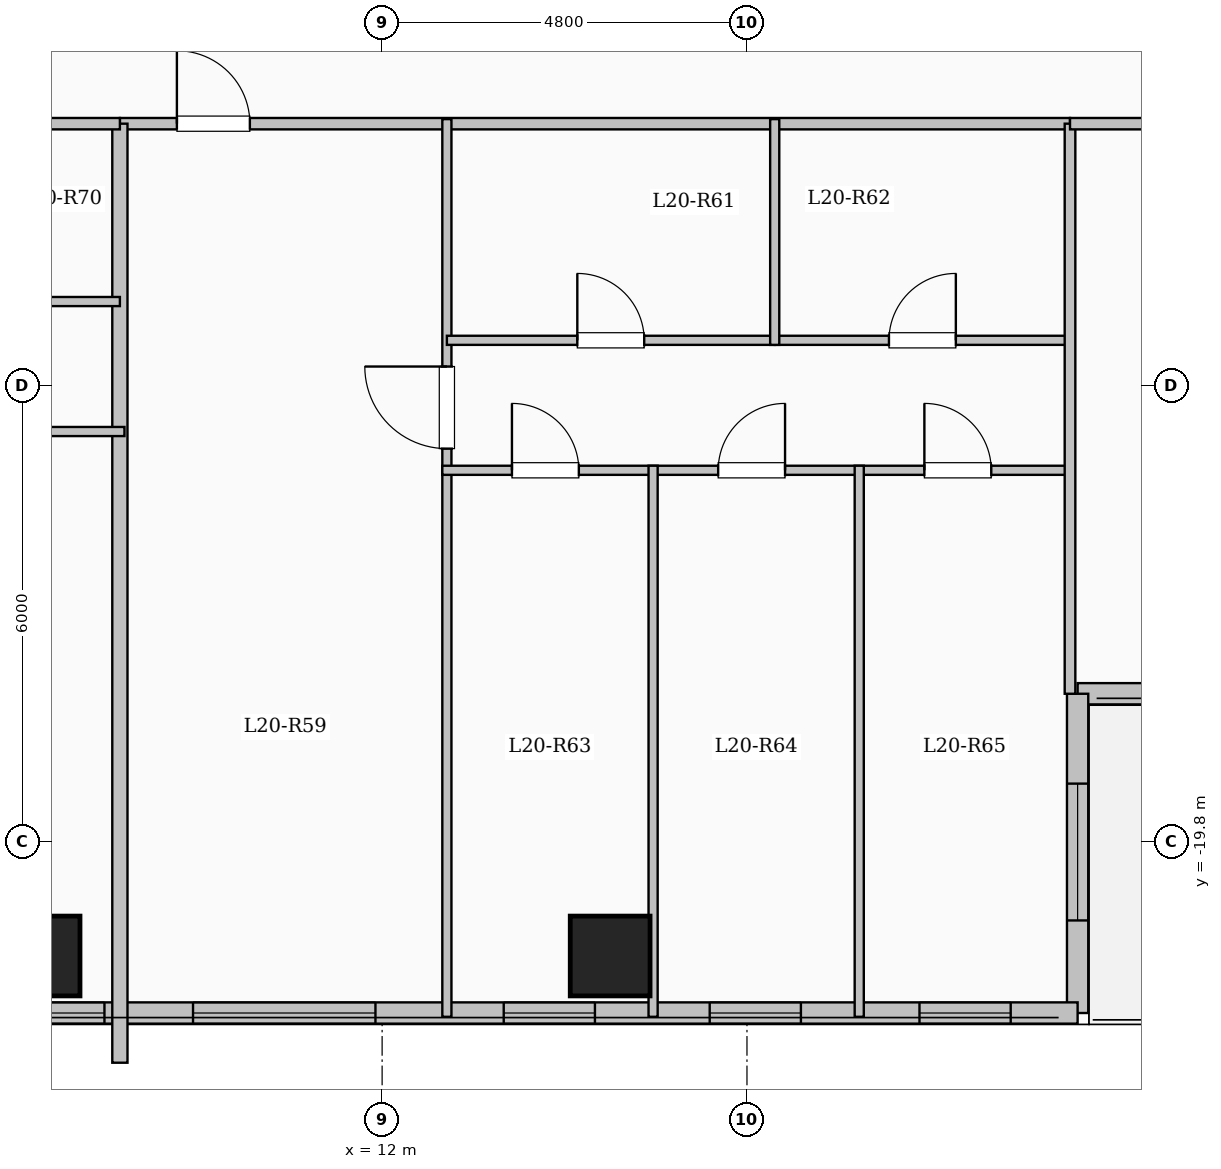
"""IFC4 building model, lengths in metres.
Left out: names, types, materials, properties, quantities, classifications, styles, units other than length and angle.
Written with IfcOpenShell. Run it as: python <this file> out.ifc"""

import sys

from ifc_helpers import new_model, si_unit, direction, frame, frame_2d, origin, origin_2d, place, context, subcontext, project, spatial, rectangle, extrude, element, fill, save


model = new_model("IFC4")
c1 = context("Model", 3, precision=1e-05, world=origin(), true_north=direction((0.0, 1.0)))
c2 = subcontext(c1, "Body", "Model", "MODEL_VIEW")
j1 = project(units=[si_unit("LENGTHUNIT", "METRE"), si_unit("PLANEANGLEUNIT", "RADIAN")], contexts=[c1])
p1 = place(None, origin())
s1 = spatial("IfcSite", under=j1, at=p1, CompositionType="ELEMENT")
p2 = place(p1, origin())
s2 = spatial("IfcBuilding", under=s1, at=p2, CompositionType="ELEMENT")
p3 = place(p2, frame((0.0, 0.0, 78.3)))
s3 = spatial("IfcBuildingStorey", under=s2, at=p3, CompositionType="ELEMENT", Elevation=78.3)
for number, where, z_axis, x_axis in (
    (1, (7.5, -21.3, 0.0), (0.0, 0.0, 1.0), (1.0, 0.0, 0.0)),
    (2, (15.0, -21.3, 0.0), (0.0, 0.0, 1.0), (1.0, 0.0, 0.0)),
):
    element("IfcColumn", number, at=place(p3, frame(where, z_axis=z_axis, x_axis=x_axis)), inside=s3, PredefinedType="COLUMN", context=c2, shape_type="SweptSolid", body=[
        extrude(rectangle(XDim=1.05, YDim=1.05, at=origin_2d()), origin(), (0.0, 0.0, 1.0), 3.35),
    ])
p4 = place(p3, frame((26.85, -17.85, 0.0), z_axis=(0.0, 0.0, 1.0), x_axis=(-1.0, 0.0, 0.0)))
e3 = element("IfcWall", 3, at=p4, inside=s3, PredefinedType="SOLIDWALL", context=c2, shape_type="SweptSolid", body=[
    extrude(rectangle(XDim=5.7, YDim=0.28, at=frame_2d((2.85, 0.0))), origin(), (0.0, 0.0, 1.0), 3.1),
])
p5 = place(p4, frame((2.5, 0.0, 0.0)))
e4 = element("IfcOpeningElement", 4, at=p5, cuts=e3, PredefinedType="OPENING", context=c2, shape_type="SweptSolid", body=[
    extrude(rectangle(XDim=1.1, YDim=2.2, at=frame_2d((0.55, 1.1))), frame((0.0, 0.15, 0.0), z_axis=(0.0, -1.0, 0.0), x_axis=(1.0, 0.0, 0.0)), (0.0, 0.0, 1.0), 0.3),
])
p6 = place(p4, frame((0.755, 0.0, 0.95)))
e5 = element("IfcOpeningElement", 5, at=p6, cuts=e3, PredefinedType="OPENING", context=c2, shape_type="SweptSolid", body=[
    extrude(rectangle(XDim=1.2, YDim=1.5, at=frame_2d((0.6, 0.75))), frame((0.0, 0.15, 0.0), z_axis=(0.0, -1.0, 0.0), x_axis=(1.0, 0.0, 0.0)), (0.0, 0.0, 1.0), 0.3),
])
p7 = place(p3, frame((21.15, -17.85, 0.0), z_axis=(0.0, 0.0, 1.0), x_axis=(0.0, -1.0, 0.0)))
e6 = element("IfcWall", 6, at=p7, inside=s3, PredefinedType="SOLIDWALL", context=c2, shape_type="SweptSolid", body=[
    extrude(rectangle(XDim=4.2, YDim=0.28, at=frame_2d((2.1, 0.0))), origin(), (0.0, 0.0, 1.0), 3.1),
])
p8 = place(p7, frame((1.182, 0.0, 0.9)))
e7 = element("IfcOpeningElement", 7, at=p8, cuts=e6, PredefinedType="OPENING", context=c2, shape_type="SweptSolid", body=[
    extrude(rectangle(XDim=1.8, YDim=1.65, at=frame_2d((0.9, 0.825))), frame((0.0, 0.15, 0.0), z_axis=(0.0, -1.0, 0.0), x_axis=(1.0, 0.0, 0.0)), (0.0, 0.0, 1.0), 0.3),
])
p9 = place(p3, frame((21.15, -22.05, 0.0), z_axis=(0.0, 0.0, 1.0), x_axis=(-1.0, 0.0, 0.0)))
e8 = element("IfcWall", 8, at=p9, inside=s3, PredefinedType="SOLIDWALL", context=c2, shape_type="SweptSolid", body=[
    extrude(rectangle(XDim=13.8, YDim=0.28, at=frame_2d((6.9, 0.0))), origin(), (0.0, 0.0, 1.0), 3.1),
])
p10 = place(p9, frame((0.88, 0.0, 0.95)))
e9 = element("IfcOpeningElement", 9, at=p10, cuts=e8, PredefinedType="OPENING", context=c2, shape_type="SweptSolid", body=[
    extrude(rectangle(XDim=1.2, YDim=1.5, at=frame_2d((0.6, 0.75))), frame((0.0, 0.15, 0.0), z_axis=(0.0, -1.0, 0.0), x_axis=(1.0, 0.0, 0.0)), (0.0, 0.0, 1.0), 0.3),
])
p11 = place(p9, frame((3.64, 0.0, 0.95)))
e10 = element("IfcOpeningElement", 10, at=p11, cuts=e8, PredefinedType="OPENING", context=c2, shape_type="SweptSolid", body=[
    extrude(rectangle(XDim=1.2, YDim=1.5, at=frame_2d((0.6, 0.75))), frame((0.0, 0.15, 0.0), z_axis=(0.0, -1.0, 0.0), x_axis=(1.0, 0.0, 0.0)), (0.0, 0.0, 1.0), 0.3),
])
p12 = place(p9, frame((6.35, 0.0, 0.95)))
e11 = element("IfcOpeningElement", 11, at=p12, cuts=e8, PredefinedType="OPENING", context=c2, shape_type="SweptSolid", body=[
    extrude(rectangle(XDim=1.2, YDim=1.5, at=frame_2d((0.6, 0.75))), frame((0.0, 0.15, 0.0), z_axis=(0.0, -1.0, 0.0), x_axis=(1.0, 0.0, 0.0)), (0.0, 0.0, 1.0), 0.3),
])
p13 = place(p9, frame((9.238, 0.0, 0.9)))
e12 = element("IfcOpeningElement", 12, at=p13, cuts=e8, PredefinedType="OPENING", context=c2, shape_type="SweptSolid", body=[
    extrude(rectangle(XDim=2.4, YDim=1.8, at=frame_2d((1.2, 0.9))), frame((0.0, 0.15, 0.0), z_axis=(0.0, -1.0, 0.0), x_axis=(1.0, 0.0, 0.0)), (0.0, 0.0, 1.0), 0.3),
])
p14 = place(p9, frame((12.803, 0.0, 0.95)))
e13 = element("IfcOpeningElement", 13, at=p14, cuts=e8, PredefinedType="OPENING", context=c2, shape_type="SweptSolid", body=[
    extrude(rectangle(XDim=0.85, YDim=1.5, at=frame_2d((0.425, 0.75))), frame((0.0, 0.15, 0.0), z_axis=(0.0, -1.0, 0.0), x_axis=(1.0, 0.0, 0.0)), (0.0, 0.0, 1.0), 0.3),
])
p15 = place(p3, frame((8.55, -10.35, 0.0), z_axis=(0.0, 0.0, 1.0), x_axis=(1.0, 0.0, 0.0)))
e14 = element("IfcWall", 14, at=p15, inside=s3, PredefinedType="PARTITIONING", context=c2, shape_type="SweptSolid", body=[
    extrude(rectangle(XDim=12.5, YDim=0.15, at=frame_2d((6.25, 0.0))), origin(), (0.0, 0.0, 1.0), 3.1),
])
p16 = place(p15, frame((0.75, 0.0, 0.0)))
e15 = element("IfcOpeningElement", 15, at=p16, cuts=e14, PredefinedType="OPENING", context=c2, shape_type="SweptSolid", body=[
    extrude(rectangle(XDim=0.96, YDim=2.15, at=frame_2d((0.48, 1.075))), frame((0.0, 0.085, 0.0), z_axis=(0.0, -1.0, 0.0), x_axis=(1.0, 0.0, 0.0)), (0.0, 0.0, 1.0), 0.17),
])
p17 = place(p3, frame((12.852, -22.1, 0.0), z_axis=(0.0, 0.0, 1.0), x_axis=(0.0, 1.0, 0.0)))
e16 = element("IfcWall", 16, at=p17, inside=s3, PredefinedType="PARTITIONING", context=c2, shape_type="SweptSolid", body=[
    extrude(rectangle(XDim=11.81, YDim=0.12, at=frame_2d((5.905, 0.0))), origin(), (0.0, 0.0, 1.0), 3.1),
])
p18 = place(p17, frame((7.475, 0.0, 0.0)))
e17 = element("IfcOpeningElement", 17, at=p18, cuts=e16, PredefinedType="OPENING", context=c2, shape_type="SweptSolid", body=[
    extrude(rectangle(XDim=1.08, YDim=2.15, at=frame_2d((0.54, 1.075))), frame((0.0, 0.07, 0.0), z_axis=(0.0, -1.0, 0.0), x_axis=(1.0, 0.0, 0.0)), (0.0, 0.0, 1.0), 0.14),
])
p19 = place(p3, frame((12.852, -13.2, 0.0), z_axis=(0.0, 0.0, 1.0), x_axis=(1.0, 0.0, 0.0)))
e18 = element("IfcWall", 18, at=p19, inside=s3, PredefinedType="PARTITIONING", context=c2, shape_type="SweptSolid", body=[
    extrude(rectangle(XDim=4.313, YDim=0.12, at=frame_2d((2.156, 0.0))), origin(), (0.0, 0.0, 1.0), 3.1),
])
p20 = place(p19, frame((1.716, 0.0, 0.0)))
e19 = element("IfcOpeningElement", 19, at=p20, cuts=e18, PredefinedType="OPENING", context=c2, shape_type="SweptSolid", body=[
    extrude(rectangle(XDim=0.88, YDim=2.1, at=frame_2d((0.44, 1.05))), frame((0.0, 0.07, 0.0), z_axis=(0.0, -1.0, 0.0), x_axis=(1.0, 0.0, 0.0)), (0.0, 0.0, 1.0), 0.14),
])
p21 = place(p3, frame((17.165, -13.2, 0.0), z_axis=(0.0, 0.0, 1.0), x_axis=(1.0, 0.0, 0.0)))
e20 = element("IfcWall", 20, at=p21, inside=s3, PredefinedType="PARTITIONING", context=c2, shape_type="SweptSolid", body=[
    extrude(rectangle(XDim=3.885, YDim=0.12, at=frame_2d((1.942, 0.0))), origin(), (0.0, 0.0, 1.0), 3.1),
])
p22 = place(p21, frame((1.503, 0.0, 0.0)))
e21 = element("IfcOpeningElement", 21, at=p22, cuts=e20, PredefinedType="OPENING", context=c2, shape_type="SweptSolid", body=[
    extrude(rectangle(XDim=0.88, YDim=2.1, at=frame_2d((0.44, 1.05))), frame((0.0, 0.07, 0.0), z_axis=(0.0, -1.0, 0.0), x_axis=(1.0, 0.0, 0.0)), (0.0, 0.0, 1.0), 0.14),
])
p23 = place(p3, frame((12.792, -14.91, 0.0), z_axis=(0.0, 0.0, 1.0), x_axis=(1.0, 0.0, 0.0)))
e22 = element("IfcWall", 22, at=p23, inside=s3, PredefinedType="PARTITIONING", context=c2, shape_type="SweptSolid", body=[
    extrude(rectangle(XDim=8.318, YDim=0.12, at=frame_2d((4.159, 0.0))), origin(), (0.0, 0.0, 1.0), 3.1),
])
p24 = place(p23, frame((0.916, 0.0, 0.0)))
e23 = element("IfcOpeningElement", 23, at=p24, cuts=e22, PredefinedType="OPENING", context=c2, shape_type="SweptSolid", body=[
    extrude(rectangle(XDim=0.88, YDim=2.1, at=frame_2d((0.44, 1.05))), frame((0.0, 0.07, 0.0), z_axis=(0.0, -1.0, 0.0), x_axis=(1.0, 0.0, 0.0)), (0.0, 0.0, 1.0), 0.14),
])
p25 = place(p23, frame((3.629, 0.0, 0.0)))
e24 = element("IfcOpeningElement", 24, at=p25, cuts=e22, PredefinedType="OPENING", context=c2, shape_type="SweptSolid", body=[
    extrude(rectangle(XDim=0.88, YDim=2.1, at=frame_2d((0.44, 1.05))), frame((0.0, 0.07, 0.0), z_axis=(0.0, -1.0, 0.0), x_axis=(1.0, 0.0, 0.0)), (0.0, 0.0, 1.0), 0.14),
])
p26 = place(p23, frame((6.342, 0.0, 0.0)))
e25 = element("IfcOpeningElement", 25, at=p26, cuts=e22, PredefinedType="OPENING", context=c2, shape_type="SweptSolid", body=[
    extrude(rectangle(XDim=0.88, YDim=2.1, at=frame_2d((0.44, 1.05))), frame((0.0, 0.07, 0.0), z_axis=(0.0, -1.0, 0.0), x_axis=(1.0, 0.0, 0.0)), (0.0, 0.0, 1.0), 0.14),
])
p27 = place(p3, frame((17.165, -13.26, 0.0), z_axis=(0.0, 0.0, 1.0), x_axis=(0.0, 1.0, 0.0)))
e26 = element("IfcWall", 26, at=p27, inside=s3, PredefinedType="PARTITIONING", context=c2, shape_type="SweptSolid", body=[
    extrude(rectangle(XDim=2.97, YDim=0.12, at=frame_2d((1.485, 0.0))), origin(), (0.0, 0.0, 1.0), 3.1),
])
for number, where, z_axis, x_axis in (
    (27, (15.565, -22.1, 0.0), (0.0, 0.0, 1.0), (0.0, 1.0, 0.0)),
    (28, (18.277, -22.1, 0.0), (0.0, 0.0, 1.0), (0.0, 1.0, 0.0)),
):
    element("IfcWall", number, at=place(p3, frame(where, z_axis=z_axis, x_axis=x_axis)), inside=s3, PredefinedType="PARTITIONING", context=c2, shape_type="SweptSolid", body=[
        extrude(rectangle(XDim=7.25, YDim=0.12, at=frame_2d((3.625, 0.0))), origin(), (0.0, 0.0, 1.0), 3.1),
    ])
p28 = place(p3, frame((8.55, -22.704, 0.0), z_axis=(0.0, 0.0, 1.0), x_axis=(0.0, 1.0, 0.0)))
e29 = element("IfcWall", 29, at=p28, inside=s3, PredefinedType="SOLIDWALL", context=c2, shape_type="SweptSolid", body=[
    extrude(rectangle(XDim=12.354, YDim=0.2, at=frame_2d((6.177, 0.0))), origin(), (0.0, 0.0, 1.0), 3.1),
])
p29 = place(p3, frame((-8.55, -10.35, 0.0), z_axis=(0.0, 0.0, 1.0), x_axis=(1.0, 0.0, 0.0)))
e30 = element("IfcWall", 30, at=p29, inside=s3, PredefinedType="PARTITIONING", context=c2, shape_type="SweptSolid", body=[
    extrude(rectangle(XDim=17.1, YDim=0.15, at=frame_2d((8.55, 0.0))), origin(), (0.0, 0.0, 1.0), 3.1),
])
p30 = place(p29, frame((1.6, 0.0, 0.0)))
e31 = element("IfcOpeningElement", 31, at=p30, cuts=e30, PredefinedType="OPENING", context=c2, shape_type="SweptSolid", body=[
    extrude(rectangle(XDim=0.96, YDim=2.15, at=frame_2d((0.48, 1.075))), frame((0.0, 0.085, 0.0), z_axis=(0.0, -1.0, 0.0), x_axis=(1.0, 0.0, 0.0)), (0.0, 0.0, 1.0), 0.17),
])
p31 = place(p3, frame((4.104, -12.69, 0.0), z_axis=(0.0, 0.0, 1.0), x_axis=(1.0, 0.0, 0.0)))
e32 = element("IfcWall", 32, at=p31, inside=s3, PredefinedType="PARTITIONING", context=c2, shape_type="SweptSolid", body=[
    extrude(rectangle(XDim=4.446, YDim=0.12, at=frame_2d((2.223, 0.0))), origin(), (0.0, 0.0, 1.0), 2.635),
])
p32 = place(p31, frame((1.783, 0.0, 0.0)))
e33 = element("IfcOpeningElement", 33, at=p32, cuts=e32, PredefinedType="OPENING", context=c2, shape_type="SweptSolid", body=[
    extrude(rectangle(XDim=0.88, YDim=2.1, at=frame_2d((0.44, 1.05))), frame((0.0, 0.07, 0.0), z_axis=(0.0, -1.0, 0.0), x_axis=(1.0, 0.0, 0.0)), (0.0, 0.0, 1.0), 0.14),
])
p33 = place(p3, frame((-1.756, -14.4, 0.0), z_axis=(0.0, 0.0, 1.0), x_axis=(1.0, 0.0, 0.0)))
e34 = element("IfcWall", 34, at=p33, inside=s3, PredefinedType="PARTITIONING", context=c2, shape_type="SweptSolid", body=[
    extrude(rectangle(XDim=10.366, YDim=0.12, at=frame_2d((5.183, 0.0))), origin(), (0.0, 0.0, 1.0), 2.635),
])
p34 = place(p33, frame((1.256, 0.0, 0.0)))
e35 = element("IfcOpeningElement", 35, at=p34, cuts=e34, PredefinedType="OPENING", context=c2, shape_type="SweptSolid", body=[
    extrude(rectangle(XDim=0.88, YDim=2.1, at=frame_2d((0.44, 1.05))), frame((0.0, 0.07, 0.0), z_axis=(0.0, -1.0, 0.0), x_axis=(1.0, 0.0, 0.0)), (0.0, 0.0, 1.0), 0.14),
])
p35 = place(p33, frame((4.648, 0.0, 0.0)))
e36 = element("IfcOpeningElement", 36, at=p35, cuts=e34, PredefinedType="OPENING", context=c2, shape_type="SweptSolid", body=[
    extrude(rectangle(XDim=0.88, YDim=2.1, at=frame_2d((0.44, 1.05))), frame((0.0, 0.07, 0.0), z_axis=(0.0, -1.0, 0.0), x_axis=(1.0, 0.0, 0.0)), (0.0, 0.0, 1.0), 0.14),
])
p36 = place(p33, frame((8.04, 0.0, 0.0)))
e37 = element("IfcOpeningElement", 37, at=p36, cuts=e34, PredefinedType="OPENING", context=c2, shape_type="SweptSolid", body=[
    extrude(rectangle(XDim=0.88, YDim=2.1, at=frame_2d((0.44, 1.05))), frame((0.0, 0.07, 0.0), z_axis=(0.0, -1.0, 0.0), x_axis=(1.0, 0.0, 0.0)), (0.0, 0.0, 1.0), 0.14),
])
p37 = place(p3, frame((21.05, -17.85, 0.0), z_axis=(0.0, 0.0, 1.0), x_axis=(0.0, 1.0, 0.0)))
e38 = element("IfcWall", 38, at=p37, inside=s3, PredefinedType="PARTITIONING", context=c2, shape_type="SweptSolid", body=[
    extrude(rectangle(XDim=7.5, YDim=0.14, at=frame_2d((3.75, 0.0))), origin(), (0.0, 0.0, 1.0), 3.1),
])
p38 = place(p3, frame((21.05, -10.35, 0.0), z_axis=(0.0, 0.0, 1.0), x_axis=(1.0, 0.0, 0.0)))
e39 = element("IfcWall", 39, at=p38, inside=s3, PredefinedType="PARTITIONING", context=c2, shape_type="SweptSolid", body=[
    extrude(rectangle(XDim=5.83, YDim=0.15, at=frame_2d((2.915, 0.0))), origin(), (0.0, 0.0, 1.0), 3.1),
])
p39 = place(p38, frame((2.44, 0.0, 0.0)))
e40 = element("IfcOpeningElement", 40, at=p39, cuts=e39, PredefinedType="OPENING", context=c2, shape_type="SweptSolid", body=[
    extrude(rectangle(XDim=0.95, YDim=2.15, at=frame_2d((0.475, 1.075))), frame((0.0, 0.085, 0.0), z_axis=(0.0, -1.0, 0.0), x_axis=(1.0, 0.0, 0.0)), (0.0, 0.0, 1.0), 0.17),
])
p40 = place(p8, origin())
e41 = element("IfcWindow", 41, at=p40, inside=s3, PartitioningType="SINGLE_PANEL", PredefinedType="WINDOW", context=c2, shape_type="SweptSolid", body=[
    extrude(rectangle(XDim=1.8, YDim=1.65, at=frame_2d((0.9, 0.825))), frame((0.0, 0.03, 0.0), z_axis=(0.0, -1.0, 0.0), x_axis=(1.0, 0.0, 0.0)), (0.0, 0.0, 1.0), 0.06),
])
fill(e7, e41)
p41 = place(p10, origin())
e42 = element("IfcWindow", 42, at=p41, inside=s3, PartitioningType="SINGLE_PANEL", PredefinedType="WINDOW", context=c2, shape_type="SweptSolid", body=[
    extrude(rectangle(XDim=1.2, YDim=1.5, at=frame_2d((0.6, 0.75))), frame((0.0, 0.03, 0.0), z_axis=(0.0, -1.0, 0.0), x_axis=(1.0, 0.0, 0.0)), (0.0, 0.0, 1.0), 0.06),
])
fill(e9, e42)
p42 = place(p11, origin())
e43 = element("IfcWindow", 43, at=p42, inside=s3, PartitioningType="SINGLE_PANEL", PredefinedType="WINDOW", context=c2, shape_type="SweptSolid", body=[
    extrude(rectangle(XDim=1.2, YDim=1.5, at=frame_2d((0.6, 0.75))), frame((0.0, 0.03, 0.0), z_axis=(0.0, -1.0, 0.0), x_axis=(1.0, 0.0, 0.0)), (0.0, 0.0, 1.0), 0.06),
])
fill(e10, e43)
p43 = place(p12, origin())
e44 = element("IfcWindow", 44, at=p43, inside=s3, PartitioningType="SINGLE_PANEL", PredefinedType="WINDOW", context=c2, shape_type="SweptSolid", body=[
    extrude(rectangle(XDim=1.2, YDim=1.5, at=frame_2d((0.6, 0.75))), frame((0.0, 0.03, 0.0), z_axis=(0.0, -1.0, 0.0), x_axis=(1.0, 0.0, 0.0)), (0.0, 0.0, 1.0), 0.06),
])
fill(e11, e44)
p44 = place(p13, origin())
e45 = element("IfcWindow", 45, at=p44, inside=s3, PartitioningType="SINGLE_PANEL", PredefinedType="WINDOW", context=c2, shape_type="SweptSolid", body=[
    extrude(rectangle(XDim=2.4, YDim=1.8, at=frame_2d((1.2, 0.9))), frame((0.0, 0.03, 0.0), z_axis=(0.0, -1.0, 0.0), x_axis=(1.0, 0.0, 0.0)), (0.0, 0.0, 1.0), 0.06),
])
fill(e12, e45)
p45 = place(p14, origin())
e46 = element("IfcWindow", 46, at=p45, inside=s3, PartitioningType="SINGLE_PANEL", PredefinedType="WINDOW", context=c2, shape_type="SweptSolid", body=[
    extrude(rectangle(XDim=0.85, YDim=1.5, at=frame_2d((0.425, 0.75))), frame((0.0, 0.03, 0.0), z_axis=(0.0, -1.0, 0.0), x_axis=(1.0, 0.0, 0.0)), (0.0, 0.0, 1.0), 0.06),
])
fill(e13, e46)
p46 = place(p16, origin())
e47 = element("IfcDoor", 47, at=p46, inside=s3, OperationType="SINGLE_SWING_LEFT", PredefinedType="DOOR", context=c2, shape_type="SweptSolid", body=[
    extrude(rectangle(XDim=0.96, YDim=2.15, at=frame_2d((0.48, 1.075))), frame((0.0, 0.025, 0.0), z_axis=(0.0, -1.0, 0.0), x_axis=(1.0, 0.0, 0.0)), (0.0, 0.0, 1.0), 0.05),
])
fill(e15, e47)
p47 = place(p18, origin())
e48 = element("IfcDoor", 48, at=p47, inside=s3, OperationType="SINGLE_SWING_RIGHT", PredefinedType="DOOR", context=c2, shape_type="SweptSolid", body=[
    extrude(rectangle(XDim=1.08, YDim=2.15, at=frame_2d((0.54, 1.075))), frame((0.0, 0.025, 0.0), z_axis=(0.0, -1.0, 0.0), x_axis=(1.0, 0.0, 0.0)), (0.0, 0.0, 1.0), 0.05),
])
fill(e17, e48)
p48 = place(p20, origin())
e49 = element("IfcDoor", 49, at=p48, inside=s3, OperationType="SINGLE_SWING_LEFT", PredefinedType="DOOR", context=c2, shape_type="SweptSolid", body=[
    extrude(rectangle(XDim=0.88, YDim=2.1, at=frame_2d((0.44, 1.05))), frame((0.0, 0.025, 0.0), z_axis=(0.0, -1.0, 0.0), x_axis=(1.0, 0.0, 0.0)), (0.0, 0.0, 1.0), 0.05),
])
fill(e19, e49)
p49 = place(p22, origin())
e50 = element("IfcDoor", 50, at=p49, inside=s3, OperationType="SINGLE_SWING_RIGHT", PredefinedType="DOOR", context=c2, shape_type="SweptSolid", body=[
    extrude(rectangle(XDim=0.88, YDim=2.1, at=frame_2d((0.44, 1.05))), frame((0.0, 0.025, 0.0), z_axis=(0.0, -1.0, 0.0), x_axis=(1.0, 0.0, 0.0)), (0.0, 0.0, 1.0), 0.05),
])
fill(e21, e50)
p50 = place(p24, origin())
e51 = element("IfcDoor", 51, at=p50, inside=s3, OperationType="SINGLE_SWING_LEFT", PredefinedType="DOOR", context=c2, shape_type="SweptSolid", body=[
    extrude(rectangle(XDim=0.88, YDim=2.1, at=frame_2d((0.44, 1.05))), frame((0.0, 0.025, 0.0), z_axis=(0.0, -1.0, 0.0), x_axis=(1.0, 0.0, 0.0)), (0.0, 0.0, 1.0), 0.05),
])
fill(e23, e51)
p51 = place(p25, origin())
e52 = element("IfcDoor", 52, at=p51, inside=s3, OperationType="SINGLE_SWING_RIGHT", PredefinedType="DOOR", context=c2, shape_type="SweptSolid", body=[
    extrude(rectangle(XDim=0.88, YDim=2.1, at=frame_2d((0.44, 1.05))), frame((0.0, 0.025, 0.0), z_axis=(0.0, -1.0, 0.0), x_axis=(1.0, 0.0, 0.0)), (0.0, 0.0, 1.0), 0.05),
])
fill(e24, e52)
p52 = place(p26, origin())
e53 = element("IfcDoor", 53, at=p52, inside=s3, OperationType="SINGLE_SWING_LEFT", PredefinedType="DOOR", context=c2, shape_type="SweptSolid", body=[
    extrude(rectangle(XDim=0.88, YDim=2.1, at=frame_2d((0.44, 1.05))), frame((0.0, 0.025, 0.0), z_axis=(0.0, -1.0, 0.0), x_axis=(1.0, 0.0, 0.0)), (0.0, 0.0, 1.0), 0.05),
])
fill(e25, e53)
save(model, sys.argv[1])
